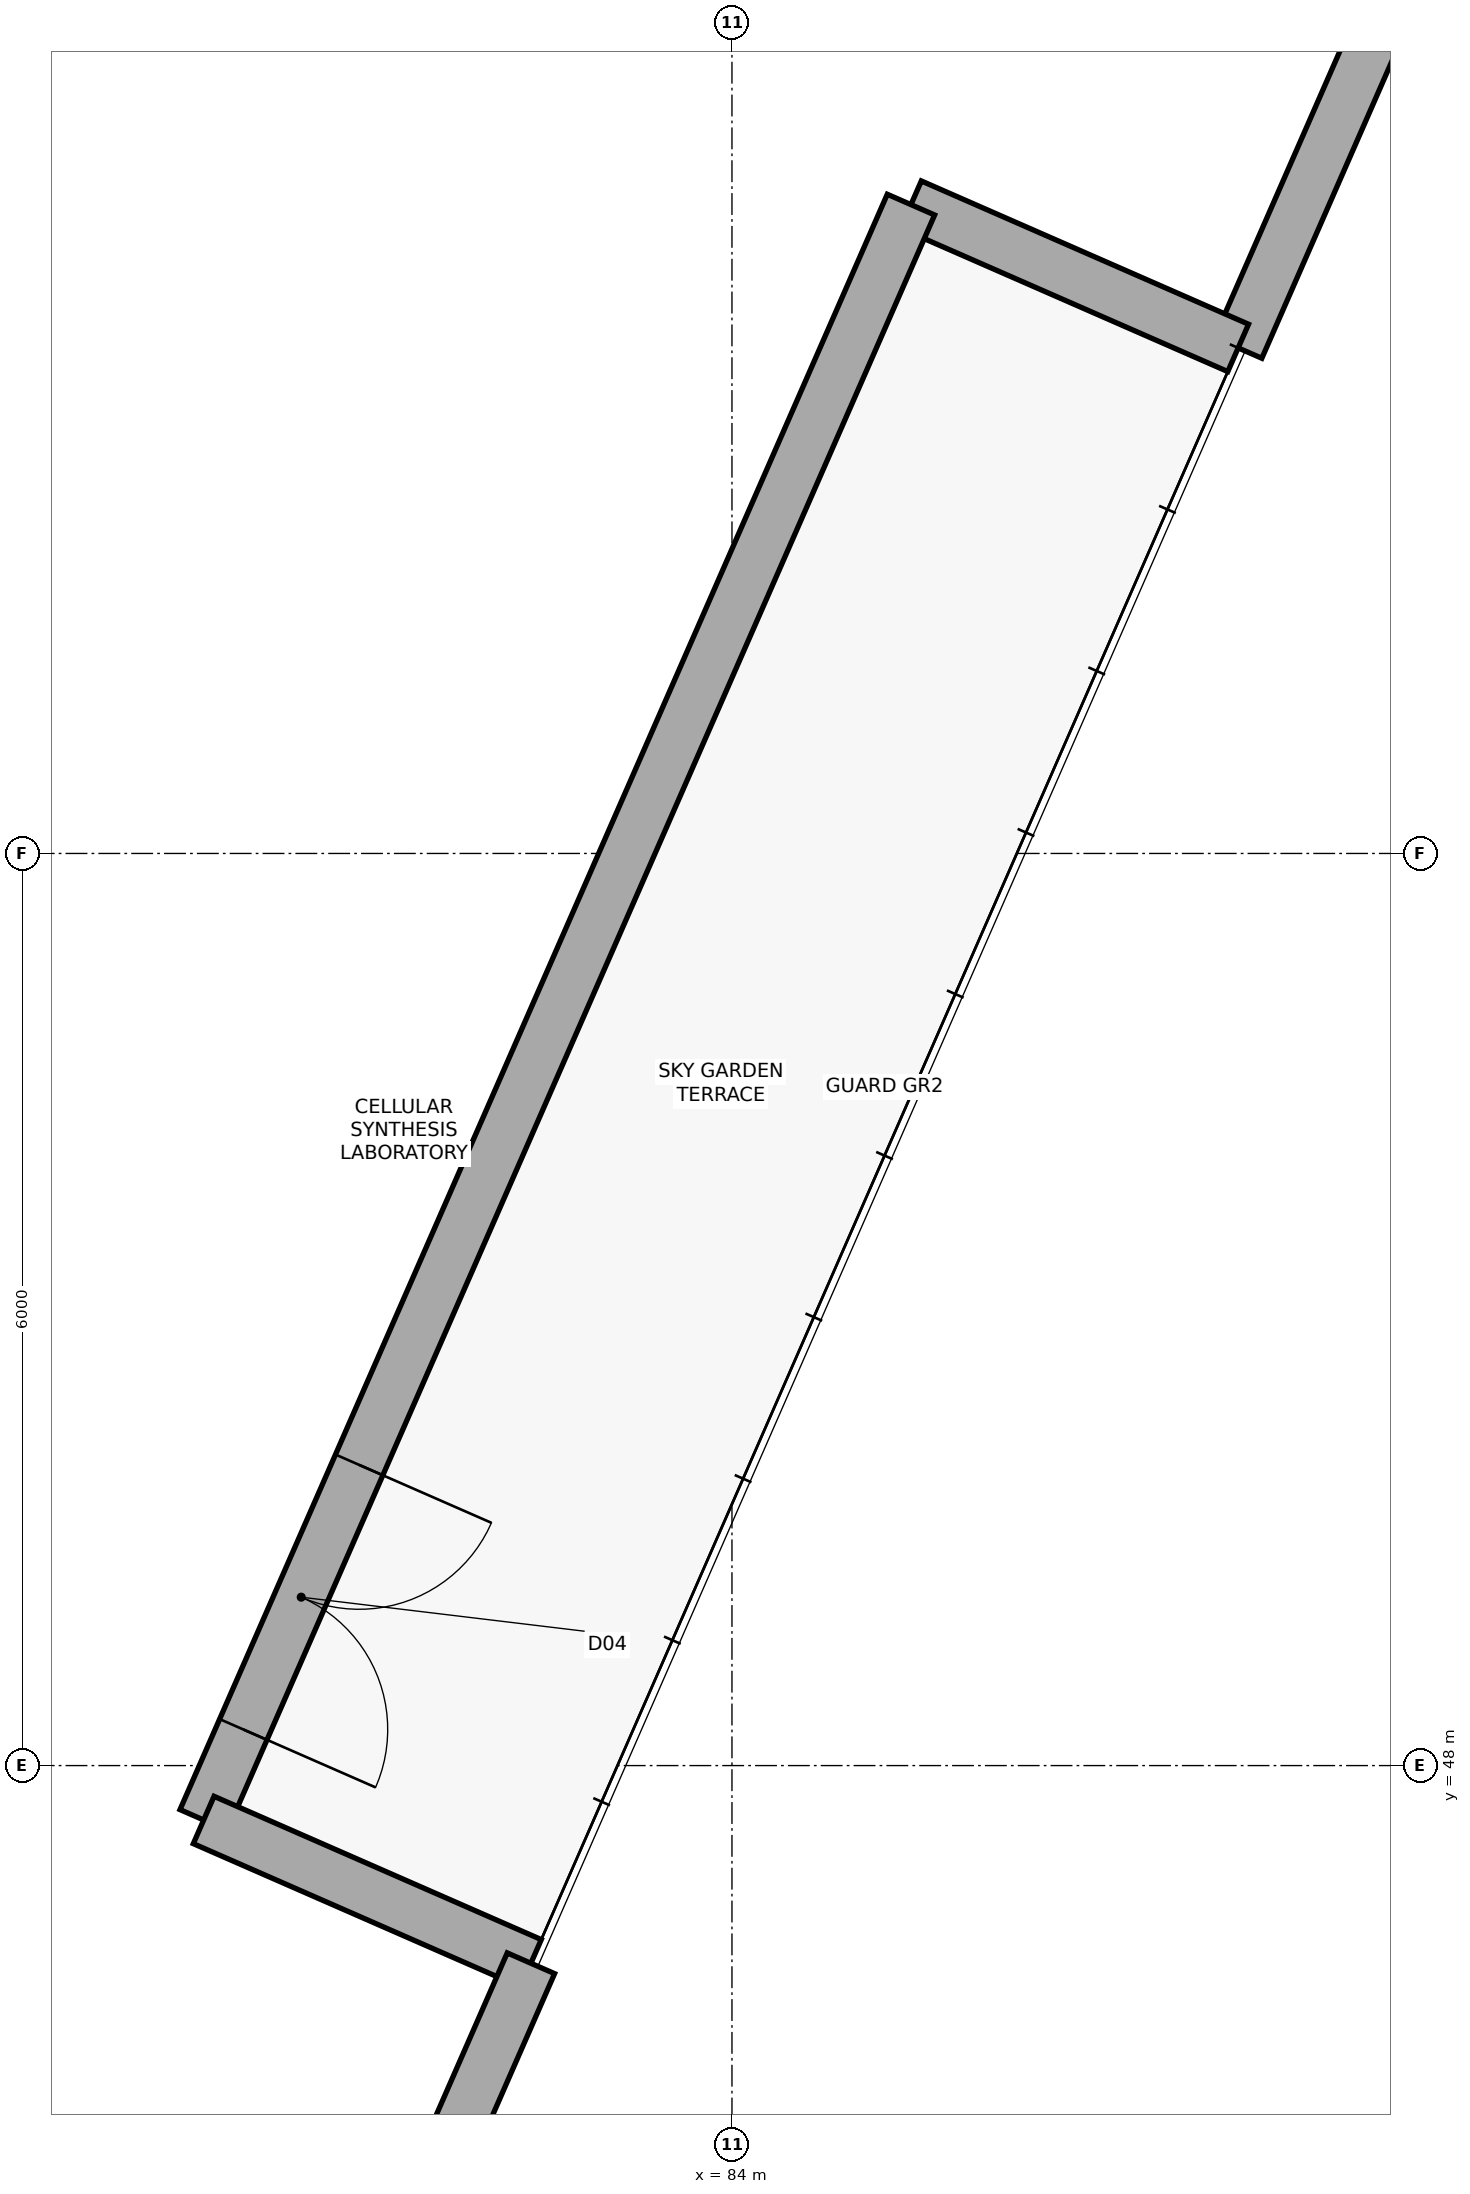
"""IFC4 building model, lengths in metres.
Left out: names, types, materials, properties, quantities, classifications, styles, units other than length and angle.
Written with IfcOpenShell. Run it as: python <this file> out.ifc"""

import sys

from ifc_helpers import new_model, si_unit, direction, frame, frame_2d, origin, place, context, subcontext, project, spatial, rectangle, extrude, element, fill, save


model = new_model("IFC4")
c1 = context("Model", 3, precision=1e-05, world=origin(), true_north=direction((0.0, 1.0)))
c2 = subcontext(c1, "Body", "Model", "MODEL_VIEW")
j1 = project(units=[si_unit("LENGTHUNIT", "METRE"), si_unit("PLANEANGLEUNIT", "RADIAN")], contexts=[c1])
p1 = place(None, origin())
s1 = spatial("IfcSite", under=j1, at=p1, CompositionType="ELEMENT")
p2 = place(p1, origin())
s2 = spatial("IfcBuilding", under=s1, at=p2, CompositionType="ELEMENT")
p3 = place(p2, frame((0.0, 0.0, 44.7)))
s3 = spatial("IfcBuildingStorey", under=s2, at=p3, CompositionType="ELEMENT", Elevation=44.7)
p4 = place(p3, frame((99.244, 84.535, 0.0), z_axis=(0.0, 0.0, 1.0), x_axis=(-0.401102097931, -0.916033354761, 0.0)))
e1 = element("IfcWall", 1, at=p4, inside=s3, PredefinedType="STANDARD", context=c2, shape_type="SweptSolid", body=[
    extrude(rectangle(XDim=29.703, YDim=0.34, at=frame_2d((14.852, 0.0))), origin(), (0.0, 0.0, 1.0), 0.85),
])
p5 = place(p3, frame((87.33, 57.326, 0.0), z_axis=(0.0, 0.0, 1.0), x_axis=(-0.916059542308, 0.401042285733, 0.0)))
e2 = element("IfcWall", 2, at=p5, inside=s3, PredefinedType="STANDARD", context=c2, shape_type="SweptSolid", body=[
    extrude(rectangle(XDim=2.35, YDim=0.34, at=frame_2d((1.175, 0.0))), origin(), (0.0, 0.0, 1.0), 2.505),
])
p6 = place(p3, frame((85.177, 58.268, 0.0), z_axis=(0.0, 0.0, 1.0), x_axis=(-0.401105876005, -0.916031700453, 0.0)))
e3 = element("IfcWall", 3, at=p6, inside=s3, PredefinedType="STANDARD", context=c2, shape_type="SweptSolid", body=[
    extrude(rectangle(XDim=11.6, YDim=0.34, at=frame_2d((5.8, 0.0))), origin(), (0.0, 0.0, 1.0), 3.375),
])
p7 = place(p6, frame((9.05, 0.0, 0.0)))
e4 = element("IfcOpeningElement", 4, at=p7, cuts=e3, PredefinedType="OPENING", context=c2, shape_type="SweptSolid", body=[
    extrude(rectangle(XDim=1.9, YDim=2.3, at=frame_2d((0.95, 1.15))), frame((0.0, 0.18, 0.0), z_axis=(0.0, -1.0, 0.0), x_axis=(1.0, 0.0, 0.0)), (0.0, 0.0, 1.0), 0.36),
])
p8 = place(p3, frame((80.525, 47.642, 0.0), z_axis=(0.0, 0.0, 1.0), x_axis=(0.916076250182, -0.401004119495, 0.0)))
e5 = element("IfcWall", 5, at=p8, inside=s3, PredefinedType="STANDARD", context=c2, shape_type="SweptSolid", body=[
    extrude(rectangle(XDim=2.35, YDim=0.34, at=frame_2d((1.175, 0.0))), origin(), (0.0, 0.0, 1.0), 2.505),
])
p9 = place(p3, frame((82.677, 46.7, 0.0), z_axis=(0.0, 0.0, 1.0), x_axis=(-0.401096058092, -0.916035999393, 0.0)))
e6 = element("IfcWall", 6, at=p9, inside=s3, PredefinedType="STANDARD", context=c2, shape_type="SweptSolid", body=[
    extrude(rectangle(XDim=29.704, YDim=0.34, at=frame_2d((14.852, 0.0))), origin(), (0.0, 0.0, 1.0), 0.85),
])
p10 = place(p7, origin())
e7 = element("IfcDoor", 7, at=p10, inside=s3, OperationType="DOUBLE_DOOR_SINGLE_SWING", PredefinedType="DOOR", context=c2, shape_type="SweptSolid", body=[
    extrude(rectangle(XDim=1.9, YDim=2.3, at=frame_2d((0.95, 1.15))), frame((0.0, 0.025, 0.0), z_axis=(0.0, -1.0, 0.0), x_axis=(1.0, 0.0, 0.0)), (0.0, 0.0, 1.0), 0.05),
])
fill(e4, e7)
save(model, sys.argv[1])
